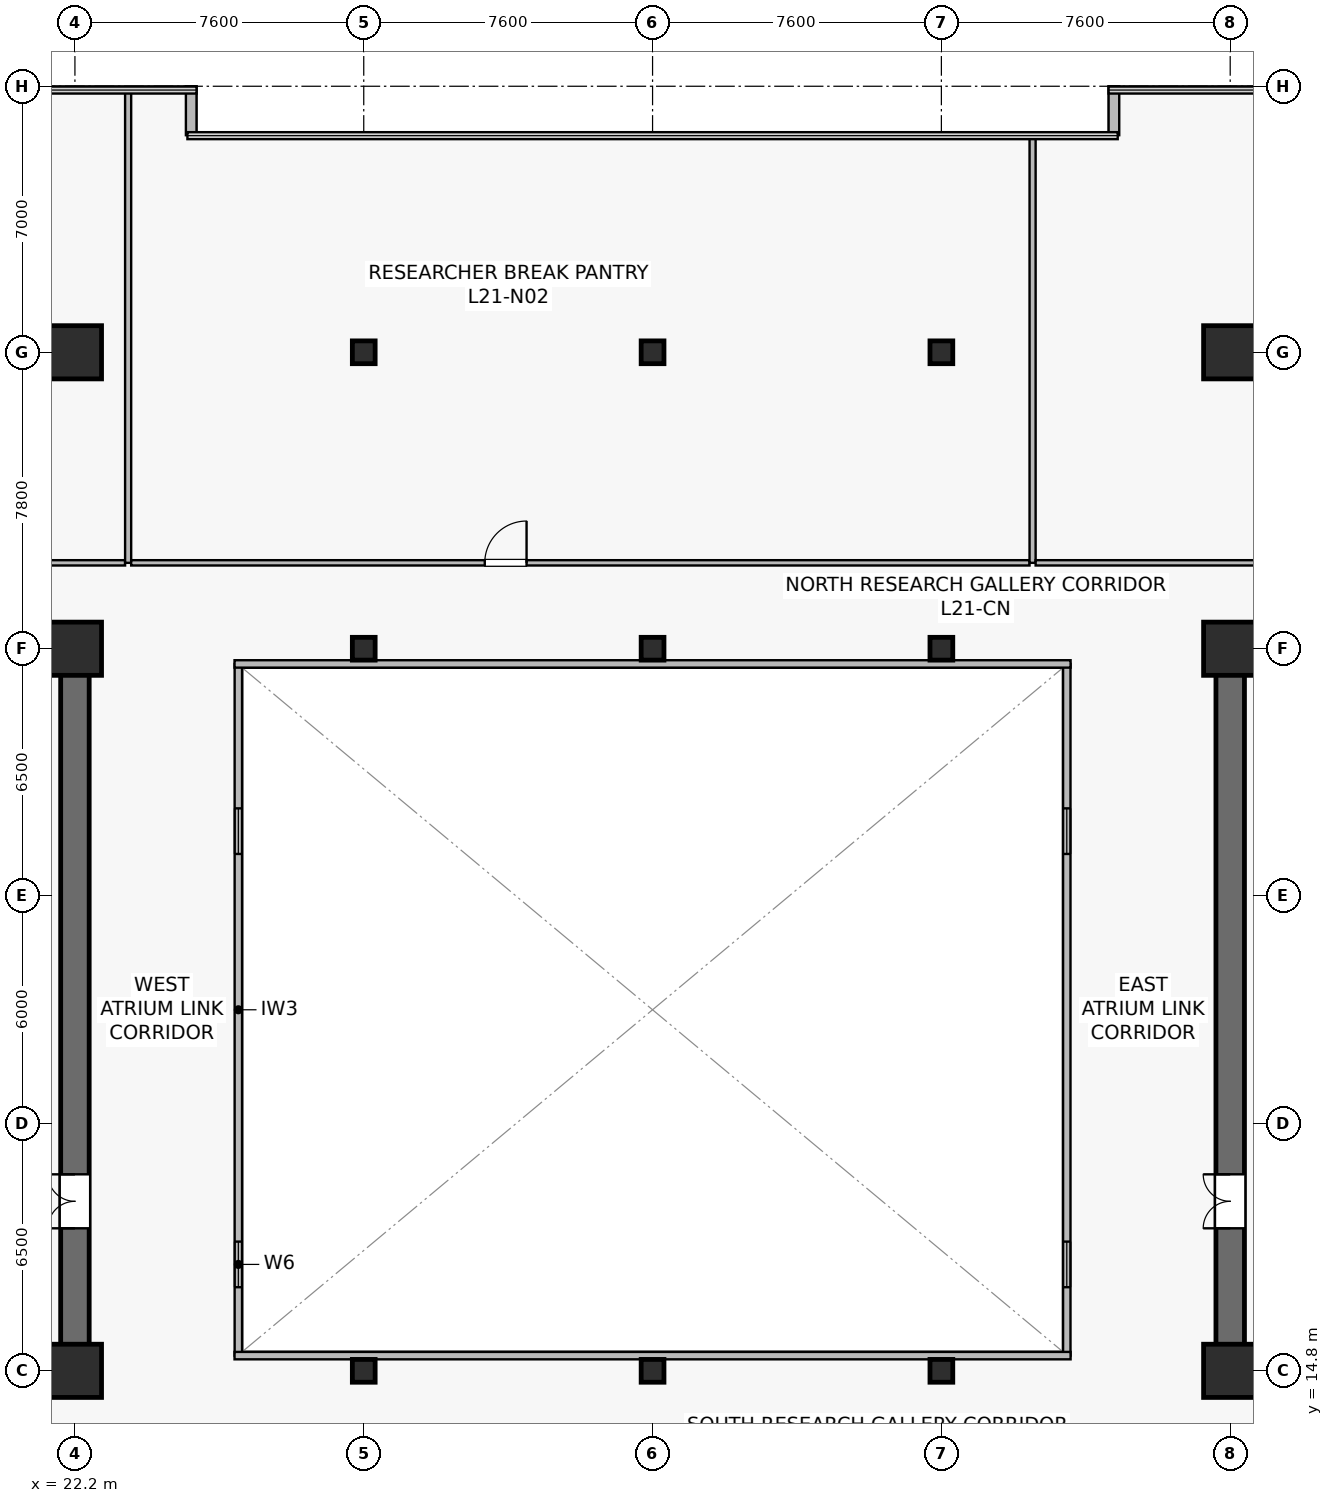
"""IFC4 building model, lengths in metres.
Left out: names, types, materials, properties, quantities, classifications, styles, units other than length and angle.
Written with IfcOpenShell. Run it as: python <this file> out.ifc"""

import sys

from ifc_helpers import new_model, si_unit, direction, frame, frame_2d, origin, origin_2d, place, context, subcontext, project, spatial, rectangle, hollow_rectangle, extrude, source, transform, mapped, element, fill, save


model = new_model("IFC4")
c1 = context("Model", 3, precision=1e-05, world=origin(), true_north=direction((0.0, 1.0)))
c2 = subcontext(c1, "Body", "Model", "MODEL_VIEW")
j1 = project(units=[si_unit("LENGTHUNIT", "METRE"), si_unit("PLANEANGLEUNIT", "RADIAN")], contexts=[c1])
p1 = place(None, origin())
s1 = spatial("IfcSite", under=j1, at=p1, CompositionType="ELEMENT")
p2 = place(p1, origin())
s2 = spatial("IfcBuilding", under=s1, at=p2, CompositionType="ELEMENT")
p3 = place(p2, frame((0.0, 0.0, 86.7)))
s3 = spatial("IfcBuildingStorey", under=s2, at=p3, CompositionType="ELEMENT", Elevation=86.7)
p4 = place(p3, frame((7.025, 14.8, 0.0), z_axis=(0.0, 0.0, 1.0), x_axis=(1.0, 0.0, 0.0)))
e1 = element("IfcWall", 1, at=p4, inside=s3, PredefinedType="SHEAR", context=c2, shape_type="SweptSolid", body=[
    extrude(rectangle(XDim=15.55, YDim=0.75, at=frame_2d((7.775, 0.0))), origin(), (0.0, 0.0, 1.0), 3.78),
])
p5 = place(p3, frame((7.025, 33.8, 0.0), z_axis=(0.0, 0.0, 1.0), x_axis=(1.0, 0.0, 0.0)))
e2 = element("IfcWall", 2, at=p5, inside=s3, PredefinedType="SHEAR", context=c2, shape_type="SweptSolid", body=[
    extrude(rectangle(XDim=15.55, YDim=0.75, at=frame_2d((7.775, 0.0))), origin(), (0.0, 0.0, 1.0), 3.78),
])
p6 = place(p5, frame((8.425, 0.0, 0.0)))
e3 = element("IfcOpeningElement", 3, at=p6, cuts=e2, PredefinedType="OPENING", context=c2, shape_type="SweptSolid", body=[
    extrude(rectangle(XDim=0.95, YDim=2.15, at=frame_2d((0.475, 1.075))), frame((0.0, 0.385, 0.0), z_axis=(0.0, -1.0, 0.0), x_axis=(1.0, 0.0, 0.0)), (0.0, 0.0, 1.0), 0.77),
])
p7 = place(p5, frame((11.965, 0.0, 0.0)))
e4 = element("IfcOpeningElement", 4, at=p7, cuts=e2, PredefinedType="OPENING", context=c2, shape_type="SweptSolid", body=[
    extrude(rectangle(XDim=0.95, YDim=2.15, at=frame_2d((0.475, 1.075))), frame((0.0, 0.385, 0.0), z_axis=(0.0, -1.0, 0.0), x_axis=(1.0, 0.0, 0.0)), (0.0, 0.0, 1.0), 0.77),
])
p8 = place(p3, frame((22.2, 15.175, 0.0), z_axis=(0.0, 0.0, 1.0), x_axis=(0.0, 1.0, 0.0)))
e5 = element("IfcWall", 5, at=p8, inside=s3, PredefinedType="SHEAR", context=c2, shape_type="SweptSolid", body=[
    extrude(rectangle(XDim=18.25, YDim=0.75, at=frame_2d((9.125, 0.0))), origin(), (0.0, 0.0, 1.0), 3.78),
])
p9 = place(p8, frame((3.375, 0.0, 0.0)))
e6 = element("IfcOpeningElement", 6, at=p9, cuts=e5, PredefinedType="OPENING", context=c2, shape_type="SweptSolid", body=[
    extrude(rectangle(XDim=1.42, YDim=2.2, at=frame_2d((0.71, 1.1))), frame((0.0, 0.385, 0.0), z_axis=(0.0, -1.0, 0.0), x_axis=(1.0, 0.0, 0.0)), (0.0, 0.0, 1.0), 0.77),
])
p10 = place(p3, frame((52.225, 14.8, 0.0), z_axis=(0.0, 0.0, 1.0), x_axis=(1.0, 0.0, 0.0)))
e7 = element("IfcWall", 7, at=p10, inside=s3, PredefinedType="SHEAR", context=c2, shape_type="SweptSolid", body=[
    extrude(rectangle(XDim=15.55, YDim=0.75, at=frame_2d((7.775, 0.0))), origin(), (0.0, 0.0, 1.0), 3.78),
])
p11 = place(p3, frame((52.225, 33.8, 0.0), z_axis=(0.0, 0.0, 1.0), x_axis=(1.0, 0.0, 0.0)))
e8 = element("IfcWall", 8, at=p11, inside=s3, PredefinedType="SHEAR", context=c2, shape_type="SweptSolid", body=[
    extrude(rectangle(XDim=15.55, YDim=0.75, at=frame_2d((7.775, 0.0))), origin(), (0.0, 0.0, 1.0), 3.78),
])
p12 = place(p11, frame((6.175, 0.0, 0.0)))
e9 = element("IfcOpeningElement", 9, at=p12, cuts=e8, PredefinedType="OPENING", context=c2, shape_type="SweptSolid", body=[
    extrude(rectangle(XDim=0.95, YDim=2.15, at=frame_2d((0.475, 1.075))), frame((0.0, 0.385, 0.0), z_axis=(0.0, -1.0, 0.0), x_axis=(1.0, 0.0, 0.0)), (0.0, 0.0, 1.0), 0.77),
])
p13 = place(p11, frame((2.635, 0.0, 0.0)))
e10 = element("IfcOpeningElement", 10, at=p13, cuts=e8, PredefinedType="OPENING", context=c2, shape_type="SweptSolid", body=[
    extrude(rectangle(XDim=0.95, YDim=2.15, at=frame_2d((0.475, 1.075))), frame((0.0, 0.385, 0.0), z_axis=(0.0, -1.0, 0.0), x_axis=(1.0, 0.0, 0.0)), (0.0, 0.0, 1.0), 0.77),
])
p14 = place(p3, frame((52.6, 15.175, 0.0), z_axis=(0.0, 0.0, 1.0), x_axis=(0.0, 1.0, 0.0)))
e11 = element("IfcWall", 11, at=p14, inside=s3, PredefinedType="SHEAR", context=c2, shape_type="SweptSolid", body=[
    extrude(rectangle(XDim=18.25, YDim=0.75, at=frame_2d((9.125, 0.0))), origin(), (0.0, 0.0, 1.0), 3.78),
])
p15 = place(p14, frame((3.375, 0.0, 0.0)))
e12 = element("IfcOpeningElement", 12, at=p15, cuts=e11, PredefinedType="OPENING", context=c2, shape_type="SweptSolid", body=[
    extrude(rectangle(XDim=1.42, YDim=2.2, at=frame_2d((0.71, 1.1))), frame((0.0, 0.385, 0.0), z_axis=(0.0, -1.0, 0.0), x_axis=(1.0, 0.0, 0.0)), (0.0, 0.0, 1.0), 0.77),
])
m1 = source(origin(), c2, "Body", "SweptSolid", [
    extrude(rectangle(XDim=1.4, YDim=1.4, at=origin_2d()), origin(), (0.0, 0.0, 1.0), 4.1),
])
for number, where, z_axis, x_axis in (
    (13, (22.2, 14.8, 0.0), (0.0, 0.0, 1.0), (1.0, 0.0, 0.0)),
    (14, (22.2, 33.8, 0.0), (0.0, 0.0, 1.0), (1.0, 0.0, 0.0)),
    (15, (22.2, 41.6, 0.0), (0.0, 0.0, 1.0), (1.0, 0.0, 0.0)),
    (16, (52.6, 14.8, 0.0), (0.0, 0.0, 1.0), (1.0, 0.0, 0.0)),
    (17, (52.6, 33.8, 0.0), (0.0, 0.0, 1.0), (1.0, 0.0, 0.0)),
    (18, (52.6, 41.6, 0.0), (0.0, 0.0, 1.0), (1.0, 0.0, 0.0)),
):
    element("IfcColumn", number, at=place(p3, frame(where, z_axis=z_axis, x_axis=x_axis)), inside=s3, PredefinedType="COLUMN", context=c2, shape_type="MappedRepresentation", body=[
        mapped(m1, transform((0.0, 0.0, 0.0), scale=1.0)),
    ])
m2 = source(origin(), c2, "Body", "SweptSolid", [
    extrude(hollow_rectangle(XDim=0.6, YDim=0.6, WallThickness=0.028, at=origin_2d()), origin(), (0.0, 0.0, 1.0), 4.1),
])
for number, where, z_axis, x_axis in (
    (19, (29.8, 14.8, 0.0), (0.0, 0.0, 1.0), (1.0, 0.0, 0.0)),
    (20, (29.8, 33.8, 0.0), (0.0, 0.0, 1.0), (1.0, 0.0, 0.0)),
    (21, (29.8, 41.6, 0.0), (0.0, 0.0, 1.0), (1.0, 0.0, 0.0)),
    (22, (37.4, 14.8, 0.0), (0.0, 0.0, 1.0), (1.0, 0.0, 0.0)),
    (23, (37.4, 33.8, 0.0), (0.0, 0.0, 1.0), (1.0, 0.0, 0.0)),
    (24, (37.4, 41.6, 0.0), (0.0, 0.0, 1.0), (1.0, 0.0, 0.0)),
    (25, (45.0, 14.8, 0.0), (0.0, 0.0, 1.0), (1.0, 0.0, 0.0)),
    (26, (45.0, 33.8, 0.0), (0.0, 0.0, 1.0), (1.0, 0.0, 0.0)),
    (27, (45.0, 41.6, 0.0), (0.0, 0.0, 1.0), (1.0, 0.0, 0.0)),
):
    element("IfcColumn", number, at=place(p3, frame(where, z_axis=z_axis, x_axis=x_axis)), inside=s3, PredefinedType="COLUMN", context=c2, shape_type="MappedRepresentation", body=[
        mapped(m2, transform((0.0, 0.0, 0.0), scale=1.0)),
    ])
for number, where, z_axis, x_axis in (
    (28, (49.54, 48.6, 0.0), (0.0, 0.0, 1.0), (0.0, -1.0, 0.0)),
    (29, (25.26, 47.312, 0.0), (0.0, 0.0, 1.0), (0.0, 1.0, 0.0)),
):
    element("IfcWall", number, at=place(p3, frame(where, z_axis=z_axis, x_axis=x_axis)), inside=s3, PredefinedType="STANDARD", context=c2, shape_type="SweptSolid", body=[
        extrude(rectangle(XDim=1.288, YDim=0.28, at=frame_2d((0.644, 0.0))), origin(), (0.0, 0.0, 1.0), 3.78),
    ])
p16 = place(p3, frame((26.5, 15.2, 0.0), z_axis=(0.0, 0.0, 1.0), x_axis=(0.0, 1.0, 0.0)))
e30 = element("IfcWall", 30, at=p16, inside=s3, PredefinedType="SOLIDWALL", context=c2, shape_type="SweptSolid", body=[
    extrude(rectangle(XDim=18.2, YDim=0.195, at=frame_2d((9.1, 0.0))), origin(), (0.0, 0.0, 1.0), 3.78),
])
p17 = place(p16, frame((1.8, 0.0, 0.9)))
e31 = element("IfcOpeningElement", 31, at=p17, cuts=e30, PredefinedType="OPENING", context=c2, shape_type="SweptSolid", body=[
    extrude(rectangle(XDim=1.2, YDim=1.35, at=frame_2d((0.6, 0.675))), frame((0.0, 0.107, 0.0), z_axis=(0.0, -1.0, 0.0), x_axis=(1.0, 0.0, 0.0)), (0.0, 0.0, 1.0), 0.215),
])
p18 = place(p16, frame((13.2, 0.0, 0.9)))
e32 = element("IfcOpeningElement", 32, at=p18, cuts=e30, PredefinedType="OPENING", context=c2, shape_type="SweptSolid", body=[
    extrude(rectangle(XDim=1.2, YDim=1.35, at=frame_2d((0.6, 0.675))), frame((0.0, 0.107, 0.0), z_axis=(0.0, -1.0, 0.0), x_axis=(1.0, 0.0, 0.0)), (0.0, 0.0, 1.0), 0.215),
])
p19 = place(p3, frame((48.3, 15.2, 0.0), z_axis=(0.0, 0.0, 1.0), x_axis=(0.0, 1.0, 0.0)))
e33 = element("IfcWall", 33, at=p19, inside=s3, PredefinedType="SOLIDWALL", context=c2, shape_type="SweptSolid", body=[
    extrude(rectangle(XDim=18.2, YDim=0.195, at=frame_2d((9.1, 0.0))), origin(), (0.0, 0.0, 1.0), 3.78),
])
p20 = place(p19, frame((1.8, 0.0, 0.9)))
e34 = element("IfcOpeningElement", 34, at=p20, cuts=e33, PredefinedType="OPENING", context=c2, shape_type="SweptSolid", body=[
    extrude(rectangle(XDim=1.2, YDim=1.35, at=frame_2d((0.6, 0.675))), frame((0.0, 0.107, 0.0), z_axis=(0.0, -1.0, 0.0), x_axis=(1.0, 0.0, 0.0)), (0.0, 0.0, 1.0), 0.215),
])
p21 = place(p19, frame((13.2, 0.0, 0.9)))
e35 = element("IfcOpeningElement", 35, at=p21, cuts=e33, PredefinedType="OPENING", context=c2, shape_type="SweptSolid", body=[
    extrude(rectangle(XDim=1.2, YDim=1.35, at=frame_2d((0.6, 0.675))), frame((0.0, 0.107, 0.0), z_axis=(0.0, -1.0, 0.0), x_axis=(1.0, 0.0, 0.0)), (0.0, 0.0, 1.0), 0.215),
])
for number, where, z_axis, x_axis in (
    (36, (26.4, 15.2, 0.0), (0.0, 0.0, 1.0), (1.0, 0.0, 0.0)),
    (37, (26.4, 33.4, 0.0), (0.0, 0.0, 1.0), (1.0, 0.0, 0.0)),
):
    element("IfcWall", number, at=place(p3, frame(where, z_axis=z_axis, x_axis=x_axis)), inside=s3, PredefinedType="SOLIDWALL", context=c2, shape_type="SweptSolid", body=[
        extrude(rectangle(XDim=22.0, YDim=0.195, at=frame_2d((11.0, 0.0))), origin(), (0.0, 0.0, 1.0), 3.78),
    ])
p22 = place(p3, frame((6.98, 36.06, 0.0), z_axis=(0.0, 0.0, 1.0), x_axis=(1.0, 0.0, 0.0)))
e38 = element("IfcWall", 38, at=p22, inside=s3, PredefinedType="PARTITIONING", context=c2, shape_type="SweptSolid", body=[
    extrude(rectangle(XDim=16.54, YDim=0.14, at=frame_2d((8.27, 0.0))), origin(), (0.0, 0.0, 1.0), 3.115),
])
p23 = place(p22, frame((8.162, 0.0, 0.0)))
e39 = element("IfcOpeningElement", 39, at=p23, cuts=e38, PredefinedType="OPENING", context=c2, shape_type="SweptSolid", body=[
    extrude(rectangle(XDim=1.1, YDim=2.18, at=frame_2d((0.55, 1.09))), frame((0.0, 0.08, 0.0), z_axis=(0.0, -1.0, 0.0), x_axis=(1.0, 0.0, 0.0)), (0.0, 0.0, 1.0), 0.16),
])
p24 = place(p3, frame((23.6, 36.06, 0.0), z_axis=(0.0, 0.0, 1.0), x_axis=(0.0, 1.0, 0.0)))
e40 = element("IfcWall", 40, at=p24, inside=s3, PredefinedType="PARTITIONING", context=c2, shape_type="SweptSolid", body=[
    extrude(rectangle(XDim=12.43, YDim=0.16, at=frame_2d((6.215, 0.0))), origin(), (0.0, 0.0, 1.0), 3.015),
])
p25 = place(p3, frame((23.68, 36.06, 0.0), z_axis=(0.0, 0.0, 1.0), x_axis=(1.0, 0.0, 0.0)))
e41 = element("IfcWall", 41, at=p25, inside=s3, PredefinedType="PARTITIONING", context=c2, shape_type="SweptSolid", body=[
    extrude(rectangle(XDim=23.64, YDim=0.14, at=frame_2d((11.82, 0.0))), origin(), (0.0, 0.0, 1.0), 3.115),
])
p26 = place(p25, frame((9.304, 0.0, 0.0)))
e42 = element("IfcOpeningElement", 42, at=p26, cuts=e41, PredefinedType="OPENING", context=c2, shape_type="SweptSolid", body=[
    extrude(rectangle(XDim=1.1, YDim=2.18, at=frame_2d((0.55, 1.09))), frame((0.0, 0.08, 0.0), z_axis=(0.0, -1.0, 0.0), x_axis=(1.0, 0.0, 0.0)), (0.0, 0.0, 1.0), 0.16),
])
p27 = place(p3, frame((47.4, 36.06, 0.0), z_axis=(0.0, 0.0, 1.0), x_axis=(0.0, 1.0, 0.0)))
e43 = element("IfcWall", 43, at=p27, inside=s3, PredefinedType="PARTITIONING", context=c2, shape_type="SweptSolid", body=[
    extrude(rectangle(XDim=11.23, YDim=0.16, at=frame_2d((5.615, 0.0))), origin(), (0.0, 0.0, 1.0), 3.015),
])
p28 = place(p3, frame((47.48, 36.06, 0.0), z_axis=(0.0, 0.0, 1.0), x_axis=(1.0, 0.0, 0.0)))
e44 = element("IfcWall", 44, at=p28, inside=s3, PredefinedType="PARTITIONING", context=c2, shape_type="SweptSolid", body=[
    extrude(rectangle(XDim=20.34, YDim=0.14, at=frame_2d((10.17, 0.0))), origin(), (0.0, 0.0, 1.0), 3.115),
])
p29 = place(p28, frame((10.176, 0.0, 0.0)))
e45 = element("IfcOpeningElement", 45, at=p29, cuts=e44, PredefinedType="OPENING", context=c2, shape_type="SweptSolid", body=[
    extrude(rectangle(XDim=1.1, YDim=2.18, at=frame_2d((0.55, 1.09))), frame((0.0, 0.08, 0.0), z_axis=(0.0, -1.0, 0.0), x_axis=(1.0, 0.0, 0.0)), (0.0, 0.0, 1.0), 0.16),
])
m3 = source(origin(), c2, "Body", "SweptSolid", [
    extrude(rectangle(XDim=1.2, YDim=1.35, at=frame_2d((0.6, 0.675))), frame((0.0, 0.03, 0.0), z_axis=(0.0, -1.0, 0.0), x_axis=(1.0, 0.0, 0.0)), (0.0, 0.0, 1.0), 0.06),
])
p30 = place(p17, origin())
e46 = element("IfcWindow", 46, at=p30, inside=s3, PartitioningType="SINGLE_PANEL", PredefinedType="WINDOW", context=c2, shape_type="MappedRepresentation", body=[
    mapped(m3, transform((0.0, 0.0, 0.0), scale=1.0)),
])
fill(e31, e46)
p31 = place(p18, origin())
e47 = element("IfcWindow", 47, at=p31, inside=s3, PartitioningType="SINGLE_PANEL", PredefinedType="WINDOW", context=c2, shape_type="MappedRepresentation", body=[
    mapped(m3, transform((0.0, 0.0, 0.0), scale=1.0)),
])
fill(e32, e47)
p32 = place(p20, origin())
e48 = element("IfcWindow", 48, at=p32, inside=s3, PartitioningType="SINGLE_PANEL", PredefinedType="WINDOW", context=c2, shape_type="MappedRepresentation", body=[
    mapped(m3, transform((0.0, 0.0, 0.0), scale=1.0)),
])
fill(e34, e48)
p33 = place(p21, origin())
e49 = element("IfcWindow", 49, at=p33, inside=s3, PartitioningType="SINGLE_PANEL", PredefinedType="WINDOW", context=c2, shape_type="MappedRepresentation", body=[
    mapped(m3, transform((0.0, 0.0, 0.0), scale=1.0)),
])
fill(e35, e49)
m4 = source(origin(), c2, "Body", "SweptSolid", [
    extrude(rectangle(XDim=1.42, YDim=2.2, at=frame_2d((0.71, 1.1))), frame((0.0, 0.025, 0.0), z_axis=(0.0, -1.0, 0.0), x_axis=(1.0, 0.0, 0.0)), (0.0, 0.0, 1.0), 0.05),
])
p34 = place(p9, origin())
e50 = element("IfcDoor", 50, at=p34, inside=s3, OperationType="DOUBLE_DOOR_SINGLE_SWING", PredefinedType="DOOR", context=c2, shape_type="MappedRepresentation", body=[
    mapped(m4, transform((0.0, 0.0, 0.0), scale=1.0)),
])
fill(e6, e50)
p35 = place(p15, origin())
e51 = element("IfcDoor", 51, at=p35, inside=s3, OperationType="DOUBLE_DOOR_SINGLE_SWING", PredefinedType="DOOR", context=c2, shape_type="MappedRepresentation", body=[
    mapped(m4, transform((0.0, 0.0, 0.0), scale=1.0)),
])
fill(e12, e51)
m5 = source(origin(), c2, "Body", "SweptSolid", [
    extrude(rectangle(XDim=1.1, YDim=2.18, at=frame_2d((0.55, 1.09))), frame((0.0, 0.025, 0.0), z_axis=(0.0, -1.0, 0.0), x_axis=(1.0, 0.0, 0.0)), (0.0, 0.0, 1.0), 0.05),
])
p36 = place(p26, origin())
e52 = element("IfcDoor", 52, at=p36, inside=s3, OperationType="SINGLE_SWING_RIGHT", PredefinedType="DOOR", context=c2, shape_type="MappedRepresentation", body=[
    mapped(m5, transform((0.0, 0.0, 0.0), scale=1.0)),
])
fill(e42, e52)
save(model, sys.argv[1])
